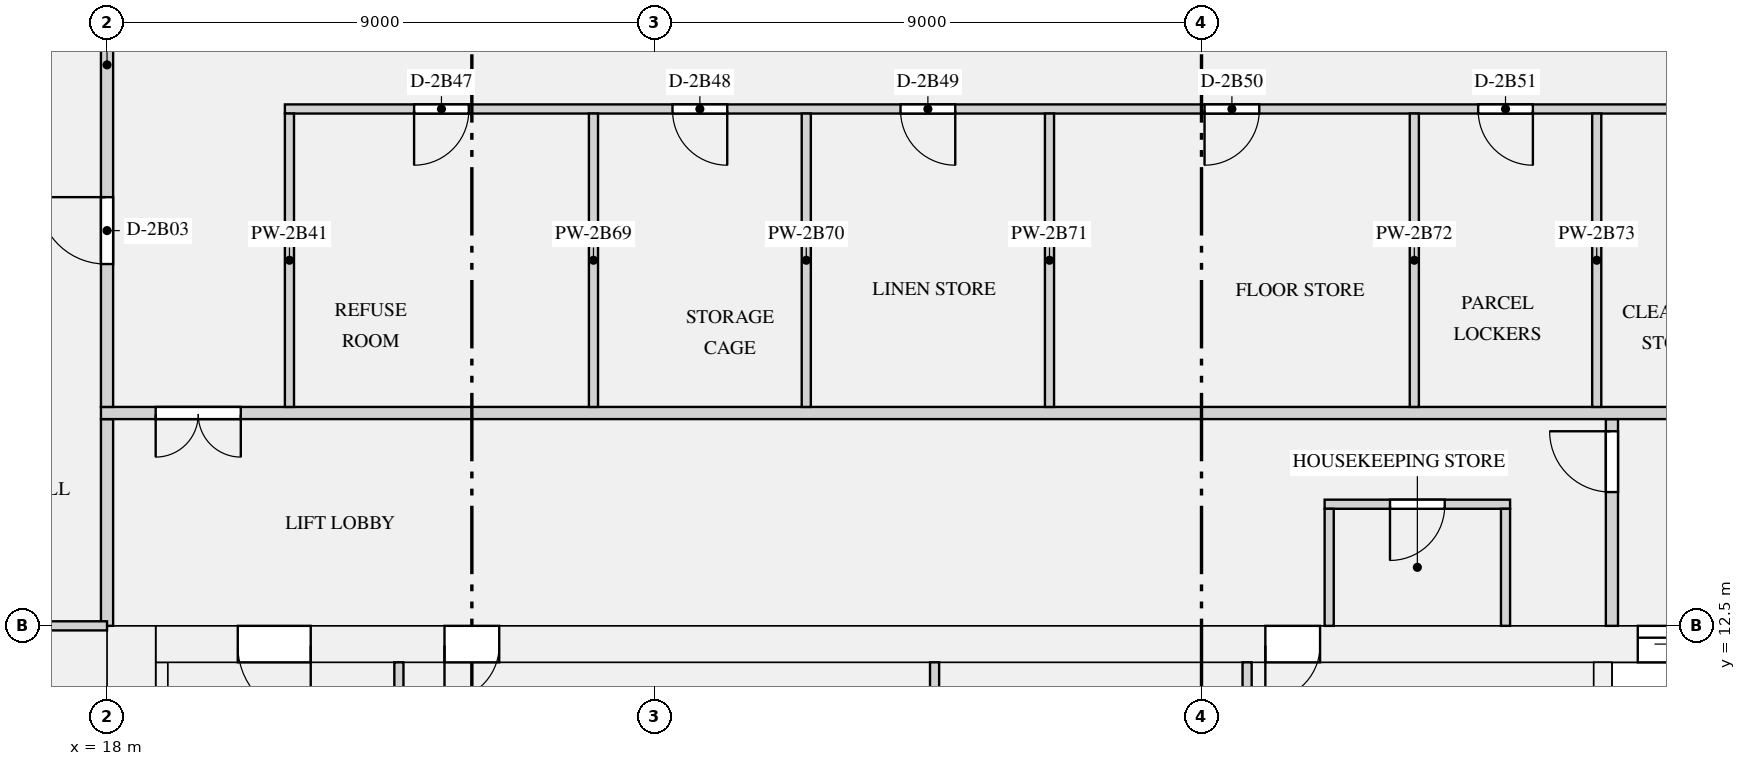
"""IFC4 building model, lengths in metres.
Left out: names, types, materials, properties, quantities, classifications, styles, units other than length and angle.
Written with IfcOpenShell. Run it as: python <this file> out.ifc"""

import sys

from ifc_helpers import new_model, si_unit, direction, frame, frame_2d, origin, place, context, subcontext, project, spatial, rectangle, extrude, element, fill, save


model = new_model("IFC4")
c1 = context("Model", 3, precision=1e-05, world=origin(), true_north=direction((0.0, 1.0)))
c2 = subcontext(c1, "Body", "Model", "MODEL_VIEW")
j1 = project(units=[si_unit("LENGTHUNIT", "METRE"), si_unit("PLANEANGLEUNIT", "RADIAN")], contexts=[c1])
p1 = place(None, origin())
s1 = spatial("IfcSite", under=j1, at=p1, CompositionType="ELEMENT")
p2 = place(p1, origin())
s2 = spatial("IfcBuilding", under=s1, at=p2, CompositionType="ELEMENT")
p3 = place(p2, frame((0.0, 0.0, 93.0)))
s3 = spatial("IfcBuildingStorey", under=s2, at=p3, CompositionType="ELEMENT", Elevation=93.0)
p4 = place(p3, frame((18.4, 0.0, 0.0), z_axis=(0.0, 0.0, 1.0), x_axis=(0.0, 1.0, 0.0)))
e1 = element("IfcWall", 1, at=p4, inside=s3, PredefinedType="SHEAR", context=c2, shape_type="SweptSolid", body=[
    extrude(rectangle(XDim=12.5, YDim=0.8, at=frame_2d((6.25, 0.0))), origin(), (0.0, 0.0, 1.0), 3.15),
])
p5 = place(p3, frame((18.8, 12.2, 0.0), z_axis=(0.0, 0.0, 1.0), x_axis=(1.0, 0.0, 0.0)))
e2 = element("IfcWall", 2, at=p5, inside=s3, PredefinedType="SHEAR", context=c2, shape_type="SweptSolid", body=[
    extrude(rectangle(XDim=34.4, YDim=0.6, at=frame_2d((17.2, 0.0))), origin(), (0.0, 0.0, 1.0), 3.15),
])
p6 = place(p5, frame((24.375, 0.0, 0.0)))
e3 = element("IfcOpeningElement", 3, at=p6, cuts=e2, PredefinedType="OPENING", context=c2, shape_type="SweptSolid", body=[
    extrude(rectangle(XDim=1.1, YDim=2.1, at=frame_2d((0.55, 1.05))), frame((0.0, 0.31, 0.0), z_axis=(0.0, -1.0, 0.0), x_axis=(1.0, 0.0, 0.0)), (0.0, 0.0, 1.0), 0.62),
])
p7 = place(p5, frame((26.625, 0.0, 0.0)))
e4 = element("IfcOpeningElement", 4, at=p7, cuts=e2, PredefinedType="OPENING", context=c2, shape_type="SweptSolid", body=[
    extrude(rectangle(XDim=1.1, YDim=2.1, at=frame_2d((0.55, 1.05))), frame((0.0, 0.31, 0.0), z_axis=(0.0, -1.0, 0.0), x_axis=(1.0, 0.0, 0.0)), (0.0, 0.0, 1.0), 0.62),
])
p8 = place(p5, frame((28.875, 0.0, 0.0)))
e5 = element("IfcOpeningElement", 5, at=p8, cuts=e2, PredefinedType="OPENING", context=c2, shape_type="SweptSolid", body=[
    extrude(rectangle(XDim=1.1, YDim=2.1, at=frame_2d((0.55, 1.05))), frame((0.0, 0.31, 0.0), z_axis=(0.0, -1.0, 0.0), x_axis=(1.0, 0.0, 0.0)), (0.0, 0.0, 1.0), 0.62),
])
p9 = place(p5, frame((4.75, 0.0, 0.0)))
e6 = element("IfcOpeningElement", 6, at=p9, cuts=e2, PredefinedType="OPENING", context=c2, shape_type="SweptSolid", body=[
    extrude(rectangle(XDim=0.9, YDim=2.1, at=frame_2d((0.45, 1.05))), frame((0.0, 0.31, 0.0), z_axis=(0.0, -1.0, 0.0), x_axis=(1.0, 0.0, 0.0)), (0.0, 0.0, 1.0), 0.62),
])
p10 = place(p5, frame((18.25, 0.0, 0.0)))
e7 = element("IfcOpeningElement", 7, at=p10, cuts=e2, PredefinedType="OPENING", context=c2, shape_type="SweptSolid", body=[
    extrude(rectangle(XDim=0.9, YDim=2.1, at=frame_2d((0.45, 1.05))), frame((0.0, 0.31, 0.0), z_axis=(0.0, -1.0, 0.0), x_axis=(1.0, 0.0, 0.0)), (0.0, 0.0, 1.0), 0.62),
])
p11 = place(p5, frame((1.35, 0.0, 0.0)))
e8 = element("IfcOpeningElement", 8, at=p11, cuts=e2, PredefinedType="OPENING", context=c2, shape_type="SweptSolid", body=[
    extrude(rectangle(XDim=1.2, YDim=2.1, at=frame_2d((0.6, 1.05))), frame((0.0, 0.31, 0.0), z_axis=(0.0, -1.0, 0.0), x_axis=(1.0, 0.0, 0.0)), (0.0, 0.0, 1.0), 0.62),
])
p12 = place(p5, frame((31.85, 0.0, 0.0)))
e9 = element("IfcOpeningElement", 9, at=p12, cuts=e2, PredefinedType="OPENING", context=c2, shape_type="SweptSolid", body=[
    extrude(rectangle(XDim=1.2, YDim=2.1, at=frame_2d((0.6, 1.05))), frame((0.0, 0.31, 0.0), z_axis=(0.0, -1.0, 0.0), x_axis=(1.0, 0.0, 0.0)), (0.0, 0.0, 1.0), 0.62),
])
p13 = place(p3, frame((18.9, 1.0, 0.0), z_axis=(0.0, 0.0, 1.0), x_axis=(0.0, 1.0, 0.0)))
e10 = element("IfcWall", 10, at=p13, inside=s3, PredefinedType="SHEAR", context=c2, shape_type="SweptSolid", body=[
    extrude(rectangle(XDim=10.9, YDim=0.2, at=frame_2d((5.45, 0.0))), origin(), (0.0, 0.0, 1.0), 3.15),
])
p14 = place(p3, frame((42.6, 8.25, 0.0), z_axis=(0.0, 0.0, 1.0), x_axis=(0.0, 1.0, 0.0)))
e11 = element("IfcWall", 11, at=p14, inside=s3, PredefinedType="SHEAR", context=c2, shape_type="SweptSolid", body=[
    extrude(rectangle(XDim=3.65, YDim=0.3, at=frame_2d((1.825, 0.0))), origin(), (0.0, 0.0, 1.0), 3.15),
])
p15 = place(p3, frame((38.025, 14.5, 0.0), z_axis=(0.0, 0.0, 1.0), x_axis=(1.0, 0.0, 0.0)))
e12 = element("IfcWall", 12, at=p15, inside=s3, PredefinedType="PARTITIONING", context=c2, shape_type="SweptSolid", body=[
    extrude(rectangle(XDim=3.05, YDim=0.15, at=frame_2d((1.525, 0.0))), origin(), (0.0, 0.0, 1.0), 2.83),
])
p16 = place(p15, frame((1.075, 0.0, 0.0)))
e13 = element("IfcOpeningElement", 13, at=p16, cuts=e12, PredefinedType="OPENING", context=c2, shape_type="SweptSolid", body=[
    extrude(rectangle(XDim=0.9, YDim=2.1, at=frame_2d((0.45, 1.05))), frame((0.0, 0.085, 0.0), z_axis=(0.0, -1.0, 0.0), x_axis=(1.0, 0.0, 0.0)), (0.0, 0.0, 1.0), 0.17),
])
p17 = place(p3, frame((36.75, 8.475, 0.0), z_axis=(0.0, 0.0, 1.0), x_axis=(0.0, 1.0, 0.0)))
e14 = element("IfcWall", 14, at=p17, inside=s3, PredefinedType="PARTITIONING", context=c2, shape_type="SweptSolid", body=[
    extrude(rectangle(XDim=3.425, YDim=0.15, at=frame_2d((1.712, 0.0))), origin(), (0.0, 0.0, 1.0), 2.83),
])
for number, where, z_axis, x_axis in (
    (15, (22.8, 8.905, 0.0), (0.0, 0.0, 1.0), (0.0, 1.0, 0.0)),
    (16, (31.61, 8.905, 0.0), (0.0, 0.0, 1.0), (0.0, 1.0, 0.0)),
):
    element("IfcWall", number, at=place(p3, frame(where, z_axis=z_axis, x_axis=x_axis)), inside=s3, PredefinedType="PARTITIONING", context=c2, shape_type="SweptSolid", body=[
        extrude(rectangle(XDim=2.995, YDim=0.15, at=frame_2d((1.498, 0.0))), origin(), (0.0, 0.0, 1.0), 2.83),
    ])
p18 = place(p3, frame((18.0, 12.5, 0.0), z_axis=(0.0, 0.0, 1.0), x_axis=(0.0, 1.0, 0.0)))
e17 = element("IfcWall", 17, at=p18, inside=s3, PredefinedType="PARTITIONING", context=c2, shape_type="SweptSolid", body=[
    extrude(rectangle(XDim=3.4, YDim=0.2, at=frame_2d((1.7, 0.0))), origin(), (0.0, 0.0, 1.0), 2.83),
])
for number, where, z_axis, x_axis in (
    (18, (38.1, 12.5, 0.0), (0.0, 0.0, 1.0), (0.0, 1.0, 0.0)),
    (19, (41.0, 12.5, 0.0), (0.0, 0.0, 1.0), (0.0, 1.0, 0.0)),
):
    element("IfcWall", number, at=place(p3, frame(where, z_axis=z_axis, x_axis=x_axis)), inside=s3, PredefinedType="PARTITIONING", context=c2, shape_type="SweptSolid", body=[
        extrude(rectangle(XDim=1.925, YDim=0.15, at=frame_2d((0.962, 0.0))), origin(), (0.0, 0.0, 1.0), 2.83),
    ])
p19 = place(p3, frame((42.75, 12.5, 0.0), z_axis=(0.0, 0.0, 1.0), x_axis=(0.0, 1.0, 0.0)))
e20 = element("IfcWall", 20, at=p19, inside=s3, PredefinedType="PARTITIONING", context=c2, shape_type="SweptSolid", body=[
    extrude(rectangle(XDim=3.4, YDim=0.2, at=frame_2d((1.7, 0.0))), origin(), (0.0, 0.0, 1.0), 2.83),
])
p20 = place(p19, frame((2.2, 0.0, 0.0)))
e21 = element("IfcOpeningElement", 21, at=p20, cuts=e20, PredefinedType="OPENING", context=c2, shape_type="SweptSolid", body=[
    extrude(rectangle(XDim=1.0, YDim=2.1, at=frame_2d((0.5, 1.05))), frame((0.0, 0.11, 0.0), z_axis=(0.0, -1.0, 0.0), x_axis=(1.0, 0.0, 0.0)), (0.0, 0.0, 1.0), 0.22),
])
p21 = place(p3, frame((20.925, 21.0, 0.0), z_axis=(0.0, 0.0, 1.0), x_axis=(1.0, 0.0, 0.0)))
e22 = element("IfcWall", 22, at=p21, inside=s3, PredefinedType="PARTITIONING", context=c2, shape_type="SweptSolid", body=[
    extrude(rectangle(XDim=30.15, YDim=0.15, at=frame_2d((15.075, 0.0))), origin(), (0.0, 0.0, 1.0), 2.83),
])
p22 = place(p21, frame((2.125, 0.0, 0.0)))
e23 = element("IfcOpeningElement", 23, at=p22, cuts=e22, PredefinedType="OPENING", context=c2, shape_type="SweptSolid", body=[
    extrude(rectangle(XDim=0.9, YDim=2.1, at=frame_2d((0.45, 1.05))), frame((0.0, 0.085, 0.0), z_axis=(0.0, -1.0, 0.0), x_axis=(1.0, 0.0, 0.0)), (0.0, 0.0, 1.0), 0.17),
])
p23 = place(p21, frame((6.375, 0.0, 0.0)))
e24 = element("IfcOpeningElement", 24, at=p23, cuts=e22, PredefinedType="OPENING", context=c2, shape_type="SweptSolid", body=[
    extrude(rectangle(XDim=0.9, YDim=2.1, at=frame_2d((0.45, 1.05))), frame((0.0, 0.085, 0.0), z_axis=(0.0, -1.0, 0.0), x_axis=(1.0, 0.0, 0.0)), (0.0, 0.0, 1.0), 0.17),
])
p24 = place(p21, frame((10.125, 0.0, 0.0)))
e25 = element("IfcOpeningElement", 25, at=p24, cuts=e22, PredefinedType="OPENING", context=c2, shape_type="SweptSolid", body=[
    extrude(rectangle(XDim=0.9, YDim=2.1, at=frame_2d((0.45, 1.05))), frame((0.0, 0.085, 0.0), z_axis=(0.0, -1.0, 0.0), x_axis=(1.0, 0.0, 0.0)), (0.0, 0.0, 1.0), 0.17),
])
p25 = place(p21, frame((15.125, 0.0, 0.0)))
e26 = element("IfcOpeningElement", 26, at=p25, cuts=e22, PredefinedType="OPENING", context=c2, shape_type="SweptSolid", body=[
    extrude(rectangle(XDim=0.9, YDim=2.1, at=frame_2d((0.45, 1.05))), frame((0.0, 0.085, 0.0), z_axis=(0.0, -1.0, 0.0), x_axis=(1.0, 0.0, 0.0)), (0.0, 0.0, 1.0), 0.17),
])
p26 = place(p21, frame((19.625, 0.0, 0.0)))
e27 = element("IfcOpeningElement", 27, at=p26, cuts=e22, PredefinedType="OPENING", context=c2, shape_type="SweptSolid", body=[
    extrude(rectangle(XDim=0.9, YDim=2.1, at=frame_2d((0.45, 1.05))), frame((0.0, 0.085, 0.0), z_axis=(0.0, -1.0, 0.0), x_axis=(1.0, 0.0, 0.0)), (0.0, 0.0, 1.0), 0.17),
])
p27 = place(p21, frame((23.375, 0.0, 0.0)))
e28 = element("IfcOpeningElement", 28, at=p27, cuts=e22, PredefinedType="OPENING", context=c2, shape_type="SweptSolid", body=[
    extrude(rectangle(XDim=0.9, YDim=2.1, at=frame_2d((0.45, 1.05))), frame((0.0, 0.085, 0.0), z_axis=(0.0, -1.0, 0.0), x_axis=(1.0, 0.0, 0.0)), (0.0, 0.0, 1.0), 0.17),
])
p28 = place(p3, frame((13.425, 12.5, 0.0), z_axis=(0.0, 0.0, 1.0), x_axis=(1.0, 0.0, 0.0)))
e29 = element("IfcWall", 29, at=p28, inside=s3, PredefinedType="PARTITIONING", context=c2, shape_type="SweptSolid", body=[
    extrude(rectangle(XDim=4.575, YDim=0.15, at=frame_2d((2.288, 0.0))), origin(), (0.0, 0.0, 1.0), 2.83),
])
p29 = place(p28, frame((1.875, 0.0, 0.0)))
e30 = element("IfcOpeningElement", 30, at=p29, cuts=e29, PredefinedType="OPENING", context=c2, shape_type="SweptSolid", body=[
    extrude(rectangle(XDim=0.9, YDim=2.1, at=frame_2d((0.45, 1.05))), frame((0.0, 0.085, 0.0), z_axis=(0.0, -1.0, 0.0), x_axis=(1.0, 0.0, 0.0)), (0.0, 0.0, 1.0), 0.17),
])
p30 = place(p3, frame((17.9, 16.0, 0.0), z_axis=(0.0, 0.0, 1.0), x_axis=(1.0, 0.0, 0.0)))
e31 = element("IfcWall", 31, at=p30, inside=s3, PredefinedType="PARTITIONING", context=c2, shape_type="SweptSolid", body=[
    extrude(rectangle(XDim=36.2, YDim=0.2, at=frame_2d((18.1, 0.0))), origin(), (0.0, 0.0, 1.0), 2.83),
])
p31 = place(p30, frame((0.9, 0.0, 0.0)))
e32 = element("IfcOpeningElement", 32, at=p31, cuts=e31, PredefinedType="OPENING", context=c2, shape_type="SweptSolid", body=[
    extrude(rectangle(XDim=1.4, YDim=2.1, at=frame_2d((0.7, 1.05))), frame((0.0, 0.11, 0.0), z_axis=(0.0, -1.0, 0.0), x_axis=(1.0, 0.0, 0.0)), (0.0, 0.0, 1.0), 0.22),
])
p32 = place(p30, frame((33.9, 0.0, 0.0)))
e33 = element("IfcOpeningElement", 33, at=p32, cuts=e31, PredefinedType="OPENING", context=c2, shape_type="SweptSolid", body=[
    extrude(rectangle(XDim=1.4, YDim=2.1, at=frame_2d((0.7, 1.05))), frame((0.0, 0.11, 0.0), z_axis=(0.0, -1.0, 0.0), x_axis=(1.0, 0.0, 0.0)), (0.0, 0.0, 1.0), 0.22),
])
p33 = place(p3, frame((18.0, 16.1, 0.0), z_axis=(0.0, 0.0, 1.0), x_axis=(0.0, 1.0, 0.0)))
e34 = element("IfcWall", 34, at=p33, inside=s3, PredefinedType="PARTITIONING", context=c2, shape_type="SweptSolid", body=[
    extrude(rectangle(XDim=7.8, YDim=0.2, at=frame_2d((3.9, 0.0))), origin(), (0.0, 0.0, 1.0), 2.83),
])
p34 = place(p33, frame((2.35, 0.0, 0.0)))
e35 = element("IfcOpeningElement", 35, at=p34, cuts=e34, PredefinedType="OPENING", context=c2, shape_type="SweptSolid", body=[
    extrude(rectangle(XDim=1.1, YDim=2.1, at=frame_2d((0.55, 1.05))), frame((0.0, 0.11, 0.0), z_axis=(0.0, -1.0, 0.0), x_axis=(1.0, 0.0, 0.0)), (0.0, 0.0, 1.0), 0.22),
])
for number, where, z_axis, x_axis in (
    (36, (21.0, 16.1, 0.0), (0.0, 0.0, 1.0), (0.0, 1.0, 0.0)),
    (37, (26.0, 16.1, 0.0), (0.0, 0.0, 1.0), (0.0, 1.0, 0.0)),
    (38, (29.5, 16.1, 0.0), (0.0, 0.0, 1.0), (0.0, 1.0, 0.0)),
    (39, (33.5, 16.1, 0.0), (0.0, 0.0, 1.0), (0.0, 1.0, 0.0)),
    (40, (39.5, 16.1, 0.0), (0.0, 0.0, 1.0), (0.0, 1.0, 0.0)),
    (41, (42.5, 16.1, 0.0), (0.0, 0.0, 1.0), (0.0, 1.0, 0.0)),
):
    element("IfcWall", number, at=place(p3, frame(where, z_axis=z_axis, x_axis=x_axis)), inside=s3, PredefinedType="PARTITIONING", context=c2, shape_type="SweptSolid", body=[
        extrude(rectangle(XDim=4.825, YDim=0.15, at=frame_2d((2.413, 0.0))), origin(), (0.0, 0.0, 1.0), 2.83),
    ])
p35 = place(p6, origin())
e42 = element("IfcDoor", 42, at=p35, inside=s3, OperationType="DOUBLE_DOOR_SLIDING", PredefinedType="DOOR", context=c2, shape_type="SweptSolid", body=[
    extrude(rectangle(XDim=1.1, YDim=2.1, at=frame_2d((0.55, 1.05))), frame((0.0, 0.025, 0.0), z_axis=(0.0, -1.0, 0.0), x_axis=(1.0, 0.0, 0.0)), (0.0, 0.0, 1.0), 0.05),
])
fill(e3, e42)
p36 = place(p16, frame((0.9, 0.0, 0.0), z_axis=(0.0, 0.0, 1.0), x_axis=(-1.0, 0.0, 0.0)))
e43 = element("IfcDoor", 43, at=p36, inside=s3, OperationType="SINGLE_SWING_RIGHT", PredefinedType="DOOR", context=c2, shape_type="SweptSolid", body=[
    extrude(rectangle(XDim=0.9, YDim=2.1, at=frame_2d((0.45, 1.05))), frame((0.0, 0.025, 0.0), z_axis=(0.0, -1.0, 0.0), x_axis=(1.0, 0.0, 0.0)), (0.0, 0.0, 1.0), 0.05),
])
fill(e13, e43)
p37 = place(p9, frame((0.9, 0.0, 0.0), z_axis=(0.0, 0.0, 1.0), x_axis=(-1.0, 0.0, 0.0)))
e44 = element("IfcDoor", 44, at=p37, inside=s3, OperationType="SINGLE_SWING_RIGHT", PredefinedType="DOOR", context=c2, shape_type="SweptSolid", body=[
    extrude(rectangle(XDim=0.9, YDim=2.1, at=frame_2d((0.45, 1.05))), frame((0.0, 0.025, 0.0), z_axis=(0.0, -1.0, 0.0), x_axis=(1.0, 0.0, 0.0)), (0.0, 0.0, 1.0), 0.05),
])
fill(e6, e44)
p38 = place(p10, frame((0.9, 0.0, 0.0), z_axis=(0.0, 0.0, 1.0), x_axis=(-1.0, 0.0, 0.0)))
e45 = element("IfcDoor", 45, at=p38, inside=s3, OperationType="SINGLE_SWING_RIGHT", PredefinedType="DOOR", context=c2, shape_type="SweptSolid", body=[
    extrude(rectangle(XDim=0.9, YDim=2.1, at=frame_2d((0.45, 1.05))), frame((0.0, 0.025, 0.0), z_axis=(0.0, -1.0, 0.0), x_axis=(1.0, 0.0, 0.0)), (0.0, 0.0, 1.0), 0.05),
])
fill(e7, e45)
p39 = place(p11, frame((1.2, 0.0, 0.0), z_axis=(0.0, 0.0, 1.0), x_axis=(-1.0, 0.0, 0.0)))
e46 = element("IfcDoor", 46, at=p39, inside=s3, OperationType="SINGLE_SWING_LEFT", PredefinedType="DOOR", context=c2, shape_type="SweptSolid", body=[
    extrude(rectangle(XDim=1.2, YDim=2.1, at=frame_2d((0.6, 1.05))), frame((0.0, 0.025, 0.0), z_axis=(0.0, -1.0, 0.0), x_axis=(1.0, 0.0, 0.0)), (0.0, 0.0, 1.0), 0.05),
])
fill(e8, e46)
p40 = place(p20, origin())
e47 = element("IfcDoor", 47, at=p40, inside=s3, OperationType="SINGLE_SWING_RIGHT", PredefinedType="DOOR", context=c2, shape_type="SweptSolid", body=[
    extrude(rectangle(XDim=1.0, YDim=2.1, at=frame_2d((0.5, 1.05))), frame((0.0, 0.025, 0.0), z_axis=(0.0, -1.0, 0.0), x_axis=(1.0, 0.0, 0.0)), (0.0, 0.0, 1.0), 0.05),
])
fill(e21, e47)
p41 = place(p31, frame((1.4, 0.0, 0.0), z_axis=(0.0, 0.0, 1.0), x_axis=(-1.0, 0.0, 0.0)))
e48 = element("IfcDoor", 48, at=p41, inside=s3, OperationType="DOUBLE_DOOR_SINGLE_SWING", PredefinedType="DOOR", context=c2, shape_type="SweptSolid", body=[
    extrude(rectangle(XDim=1.4, YDim=2.1, at=frame_2d((0.7, 1.05))), frame((0.0, 0.025, 0.0), z_axis=(0.0, -1.0, 0.0), x_axis=(1.0, 0.0, 0.0)), (0.0, 0.0, 1.0), 0.05),
])
fill(e32, e48)
p42 = place(p34, origin())
e49 = element("IfcDoor", 49, at=p42, inside=s3, OperationType="SINGLE_SWING_RIGHT", PredefinedType="DOOR", context=c2, shape_type="SweptSolid", body=[
    extrude(rectangle(XDim=1.1, YDim=2.1, at=frame_2d((0.55, 1.05))), frame((0.0, 0.025, 0.0), z_axis=(0.0, -1.0, 0.0), x_axis=(1.0, 0.0, 0.0)), (0.0, 0.0, 1.0), 0.05),
])
fill(e35, e49)
p43 = place(p22, frame((0.9, 0.0, 0.0), z_axis=(0.0, 0.0, 1.0), x_axis=(-1.0, 0.0, 0.0)))
e50 = element("IfcDoor", 50, at=p43, inside=s3, OperationType="SINGLE_SWING_RIGHT", PredefinedType="DOOR", context=c2, shape_type="SweptSolid", body=[
    extrude(rectangle(XDim=0.9, YDim=2.1, at=frame_2d((0.45, 1.05))), frame((0.0, 0.025, 0.0), z_axis=(0.0, -1.0, 0.0), x_axis=(1.0, 0.0, 0.0)), (0.0, 0.0, 1.0), 0.05),
])
fill(e23, e50)
p44 = place(p23, frame((0.9, 0.0, 0.0), z_axis=(0.0, 0.0, 1.0), x_axis=(-1.0, 0.0, 0.0)))
e51 = element("IfcDoor", 51, at=p44, inside=s3, OperationType="SINGLE_SWING_LEFT", PredefinedType="DOOR", context=c2, shape_type="SweptSolid", body=[
    extrude(rectangle(XDim=0.9, YDim=2.1, at=frame_2d((0.45, 1.05))), frame((0.0, 0.025, 0.0), z_axis=(0.0, -1.0, 0.0), x_axis=(1.0, 0.0, 0.0)), (0.0, 0.0, 1.0), 0.05),
])
fill(e24, e51)
p45 = place(p24, frame((0.9, 0.0, 0.0), z_axis=(0.0, 0.0, 1.0), x_axis=(-1.0, 0.0, 0.0)))
e52 = element("IfcDoor", 52, at=p45, inside=s3, OperationType="SINGLE_SWING_LEFT", PredefinedType="DOOR", context=c2, shape_type="SweptSolid", body=[
    extrude(rectangle(XDim=0.9, YDim=2.1, at=frame_2d((0.45, 1.05))), frame((0.0, 0.025, 0.0), z_axis=(0.0, -1.0, 0.0), x_axis=(1.0, 0.0, 0.0)), (0.0, 0.0, 1.0), 0.05),
])
fill(e25, e52)
p46 = place(p25, frame((0.9, 0.0, 0.0), z_axis=(0.0, 0.0, 1.0), x_axis=(-1.0, 0.0, 0.0)))
e53 = element("IfcDoor", 53, at=p46, inside=s3, OperationType="SINGLE_SWING_RIGHT", PredefinedType="DOOR", context=c2, shape_type="SweptSolid", body=[
    extrude(rectangle(XDim=0.9, YDim=2.1, at=frame_2d((0.45, 1.05))), frame((0.0, 0.025, 0.0), z_axis=(0.0, -1.0, 0.0), x_axis=(1.0, 0.0, 0.0)), (0.0, 0.0, 1.0), 0.05),
])
fill(e26, e53)
p47 = place(p26, frame((0.9, 0.0, 0.0), z_axis=(0.0, 0.0, 1.0), x_axis=(-1.0, 0.0, 0.0)))
e54 = element("IfcDoor", 54, at=p47, inside=s3, OperationType="SINGLE_SWING_LEFT", PredefinedType="DOOR", context=c2, shape_type="SweptSolid", body=[
    extrude(rectangle(XDim=0.9, YDim=2.1, at=frame_2d((0.45, 1.05))), frame((0.0, 0.025, 0.0), z_axis=(0.0, -1.0, 0.0), x_axis=(1.0, 0.0, 0.0)), (0.0, 0.0, 1.0), 0.05),
])
fill(e27, e54)
save(model, sys.argv[1])
